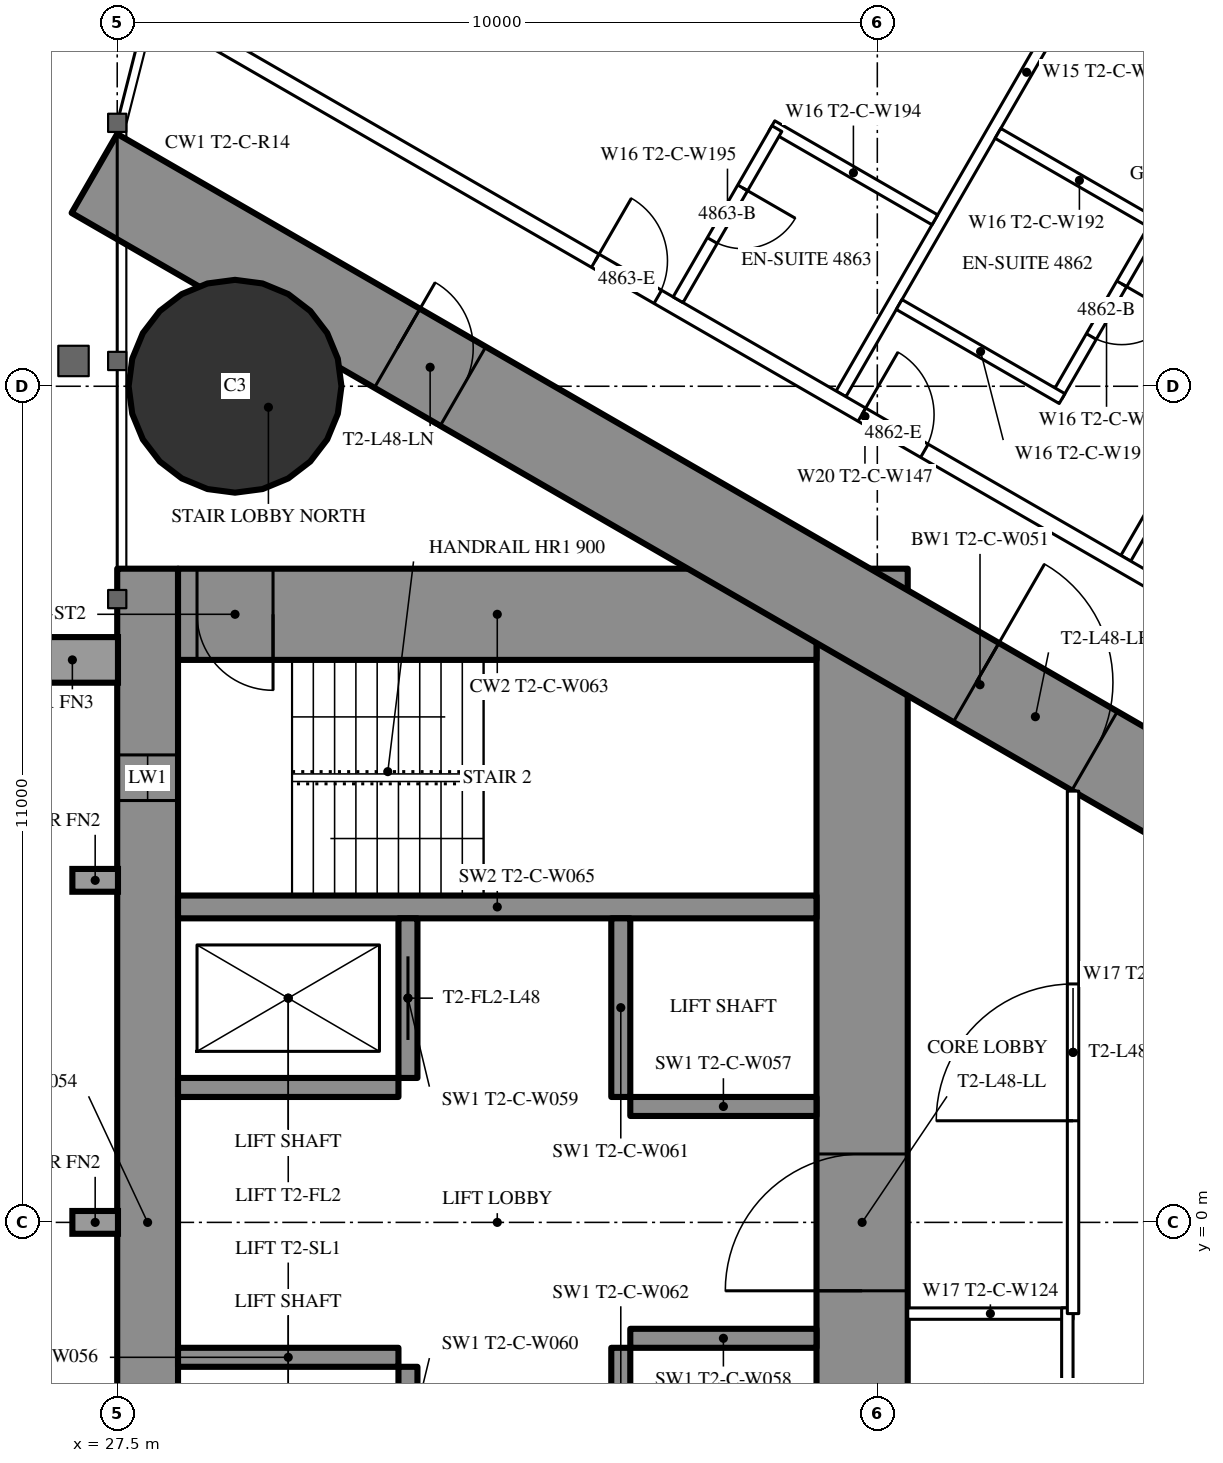
"""IFC4 building model, lengths in metres.
Left out: names, types, materials, properties, quantities, classifications, styles, units other than length and angle.
Written with IfcOpenShell. Run it as: python <this file> out.ifc"""

import sys

from ifc_helpers import new_model, si_unit, direction, frame, frame_2d, origin, origin_2d, place, context, subcontext, project, spatial, rectangle, circle, extrude, element, fill, save


model = new_model("IFC4")
c1 = context("Model", 3, precision=1e-05, world=origin(), true_north=direction((0.0, 1.0)))
c2 = subcontext(c1, "Body", "Model", "MODEL_VIEW")
j1 = project(units=[si_unit("LENGTHUNIT", "METRE"), si_unit("PLANEANGLEUNIT", "RADIAN")], contexts=[c1])
p1 = place(None, origin())
s1 = spatial("IfcSite", under=j1, at=p1, CompositionType="ELEMENT")
p2 = place(p1, origin())
s2 = spatial("IfcBuilding", under=s1, at=p2, CompositionType="ELEMENT")
p3 = place(p2, frame((0.0, 0.0, 180.8)))
s3 = spatial("IfcBuildingStorey", under=s2, at=p3, CompositionType="ELEMENT", Elevation=180.8)
p4 = place(p3, frame((29.05, 11.0, 0.0), z_axis=(0.0, 0.0, 1.0), x_axis=(1.0, 0.0, 0.0)))
e1 = element("IfcColumn", 1, at=p4, inside=s3, PredefinedType="COLUMN", context=c2, shape_type="SweptSolid", body=[
    extrude(circle(Radius=1.4, at=origin_2d()), origin(), (0.0, 0.0, 1.0), 3.5),
])
p5 = place(p3, frame((27.9, -8.6, 0.0), z_axis=(0.0, 0.0, 1.0), x_axis=(0.0, 1.0, 0.0)))
e2 = element("IfcWall", 2, at=p5, inside=s3, PredefinedType="SHEAR", context=c2, shape_type="SweptSolid", body=[
    extrude(rectangle(XDim=17.2, YDim=0.8, at=frame_2d((8.6, 0.0))), origin(), (0.0, 0.0, 1.0), 3.5),
])
p6 = place(p5, frame((2.45, 0.0, 0.6)))
e3 = element("IfcOpeningElement", 3, at=p6, cuts=e2, PredefinedType="OPENING", context=c2, shape_type="SweptSolid", body=[
    extrude(rectangle(XDim=0.6, YDim=2.1, at=frame_2d((0.3, 1.05))), frame((0.0, 0.41, 0.0), z_axis=(0.0, -1.0, 0.0), x_axis=(1.0, 0.0, 0.0)), (0.0, 0.0, 1.0), 0.82),
])
p7 = place(p5, frame((14.15, 0.0, 0.6)))
e4 = element("IfcOpeningElement", 4, at=p7, cuts=e2, PredefinedType="OPENING", context=c2, shape_type="SweptSolid", body=[
    extrude(rectangle(XDim=0.6, YDim=2.1, at=frame_2d((0.3, 1.05))), frame((0.0, 0.41, 0.0), z_axis=(0.0, -1.0, 0.0), x_axis=(1.0, 0.0, 0.0)), (0.0, 0.0, 1.0), 0.82),
])
p8 = place(p3, frame((37.3, -8.6, 0.0), z_axis=(0.0, 0.0, 1.0), x_axis=(0.0, 1.0, 0.0)))
e5 = element("IfcWall", 5, at=p8, inside=s3, PredefinedType="SHEAR", context=c2, shape_type="SweptSolid", body=[
    extrude(rectangle(XDim=17.2, YDim=1.2, at=frame_2d((8.6, 0.0))), origin(), (0.0, 0.0, 1.0), 3.5),
])
p9 = place(p8, frame((7.7, 0.0, 0.0)))
e6 = element("IfcOpeningElement", 6, at=p9, cuts=e5, PredefinedType="OPENING", context=c2, shape_type="SweptSolid", body=[
    extrude(rectangle(XDim=1.8, YDim=2.2, at=frame_2d((0.9, 1.1))), frame((0.0, 0.61, 0.0), z_axis=(0.0, -1.0, 0.0), x_axis=(1.0, 0.0, 0.0)), (0.0, 0.0, 1.0), 1.22),
])
p10 = place(p3, frame((28.3, 8.0, 0.0), z_axis=(0.0, 0.0, 1.0), x_axis=(1.0, 0.0, 0.0)))
e7 = element("IfcWall", 7, at=p10, inside=s3, PredefinedType="SHEAR", context=c2, shape_type="SweptSolid", body=[
    extrude(rectangle(XDim=8.4, YDim=1.2, at=frame_2d((4.2, 0.0))), origin(), (0.0, 0.0, 1.0), 3.5),
])
p11 = place(p10, frame((0.25, 0.0, 0.0)))
e8 = element("IfcOpeningElement", 8, at=p11, cuts=e7, PredefinedType="OPENING", context=c2, shape_type="SweptSolid", body=[
    extrude(rectangle(XDim=1.0, YDim=2.2, at=frame_2d((0.5, 1.1))), frame((0.0, 0.61, 0.0), z_axis=(0.0, -1.0, 0.0), x_axis=(1.0, 0.0, 0.0)), (0.0, 0.0, 1.0), 1.22),
])
p12 = place(p3, frame((28.3, 4.15, 0.0), z_axis=(0.0, 0.0, 1.0), x_axis=(1.0, 0.0, 0.0)))
e9 = element("IfcWall", 9, at=p12, inside=s3, PredefinedType="SHEAR", context=c2, shape_type="SweptSolid", body=[
    extrude(rectangle(XDim=8.4, YDim=0.3, at=frame_2d((4.2, 0.0))), origin(), (0.0, 0.0, 1.0), 3.5),
])
p13 = place(p3, frame((31.325, -4.0, 0.0), z_axis=(0.0, 0.0, 1.0), x_axis=(0.0, 1.0, 0.0)))
e10 = element("IfcWall", 10, at=p13, inside=s3, PredefinedType="SHEAR", context=c2, shape_type="SweptSolid", body=[
    extrude(rectangle(XDim=2.1, YDim=0.25, at=frame_2d((1.05, 0.0))), origin(), (0.0, 0.0, 1.0), 3.5),
])
p14 = place(p13, frame((0.5, 0.0, 0.0)))
e11 = element("IfcOpeningElement", 11, at=p14, cuts=e10, PredefinedType="OPENING", context=c2, shape_type="SweptSolid", body=[
    extrude(rectangle(XDim=1.1, YDim=2.2, at=frame_2d((0.55, 1.1))), frame((0.0, 0.135, 0.0), z_axis=(0.0, -1.0, 0.0), x_axis=(1.0, 0.0, 0.0)), (0.0, 0.0, 1.0), 0.27),
])
p15 = place(p3, frame((34.125, -4.0, 0.0), z_axis=(0.0, 0.0, 1.0), x_axis=(0.0, 1.0, 0.0)))
e12 = element("IfcWall", 12, at=p15, inside=s3, PredefinedType="SHEAR", context=c2, shape_type="SweptSolid", body=[
    extrude(rectangle(XDim=2.35, YDim=0.25, at=frame_2d((1.175, 0.0))), origin(), (0.0, 0.0, 1.0), 3.5),
])
p16 = place(p3, frame((28.3, -1.775, 0.0), z_axis=(0.0, 0.0, 1.0), x_axis=(1.0, 0.0, 0.0)))
e13 = element("IfcWall", 13, at=p16, inside=s3, PredefinedType="SHEAR", context=c2, shape_type="SweptSolid", body=[
    extrude(rectangle(XDim=2.9, YDim=0.25, at=frame_2d((1.45, 0.0))), origin(), (0.0, 0.0, 1.0), 3.5),
])
p17 = place(p3, frame((34.25, -1.525, 0.0), z_axis=(0.0, 0.0, 1.0), x_axis=(1.0, 0.0, 0.0)))
e14 = element("IfcWall", 14, at=p17, inside=s3, PredefinedType="SHEAR", context=c2, shape_type="SweptSolid", body=[
    extrude(rectangle(XDim=2.45, YDim=0.25, at=frame_2d((1.225, 0.0))), origin(), (0.0, 0.0, 1.0), 3.5),
])
p18 = place(p3, frame((31.325, 1.9, 0.0), z_axis=(0.0, 0.0, 1.0), x_axis=(0.0, 1.0, 0.0)))
e15 = element("IfcWall", 15, at=p18, inside=s3, PredefinedType="SHEAR", context=c2, shape_type="SweptSolid", body=[
    extrude(rectangle(XDim=2.1, YDim=0.25, at=frame_2d((1.05, 0.0))), origin(), (0.0, 0.0, 1.0), 3.5),
])
p19 = place(p18, frame((0.5, 0.0, 0.0)))
e16 = element("IfcOpeningElement", 16, at=p19, cuts=e15, PredefinedType="OPENING", context=c2, shape_type="SweptSolid", body=[
    extrude(rectangle(XDim=1.1, YDim=2.2, at=frame_2d((0.55, 1.1))), frame((0.0, 0.135, 0.0), z_axis=(0.0, -1.0, 0.0), x_axis=(1.0, 0.0, 0.0)), (0.0, 0.0, 1.0), 0.27),
])
p20 = place(p3, frame((34.125, 1.65, 0.0), z_axis=(0.0, 0.0, 1.0), x_axis=(0.0, 1.0, 0.0)))
e17 = element("IfcWall", 17, at=p20, inside=s3, PredefinedType="SHEAR", context=c2, shape_type="SweptSolid", body=[
    extrude(rectangle(XDim=2.35, YDim=0.25, at=frame_2d((1.175, 0.0))), origin(), (0.0, 0.0, 1.0), 3.5),
])
p21 = place(p3, frame((28.3, 1.775, 0.0), z_axis=(0.0, 0.0, 1.0), x_axis=(1.0, 0.0, 0.0)))
e18 = element("IfcWall", 18, at=p21, inside=s3, PredefinedType="SHEAR", context=c2, shape_type="SweptSolid", body=[
    extrude(rectangle(XDim=2.9, YDim=0.25, at=frame_2d((1.45, 0.0))), origin(), (0.0, 0.0, 1.0), 3.5),
])
p22 = place(p3, frame((34.25, 1.525, 0.0), z_axis=(0.0, 0.0, 1.0), x_axis=(1.0, 0.0, 0.0)))
e19 = element("IfcWall", 19, at=p22, inside=s3, PredefinedType="SHEAR", context=c2, shape_type="SweptSolid", body=[
    extrude(rectangle(XDim=2.45, YDim=0.25, at=frame_2d((1.225, 0.0))), origin(), (0.0, 0.0, 1.0), 3.5),
])
p23 = place(p3, frame((27.2, -13.8, 0.0), z_axis=(0.0, 0.0, 1.0), x_axis=(0.866027159892, 0.499996958321, 0.0)))
e20 = element("IfcWall", 20, at=p23, inside=s3, PredefinedType="SHEAR", context=c2, shape_type="SweptSolid", body=[
    extrude(rectangle(XDim=27.947, YDim=1.2, at=frame_2d((13.973, 0.0))), origin(), (0.0, 0.0, 1.0), 3.5),
])
p24 = place(p23, frame((4.6, 0.0, 0.0)))
e21 = element("IfcOpeningElement", 21, at=p24, cuts=e20, PredefinedType="OPENING", context=c2, shape_type="SweptSolid", body=[
    extrude(rectangle(XDim=1.0, YDim=2.2, at=frame_2d((0.5, 1.1))), frame((0.0, 0.61, 0.0), z_axis=(0.0, -1.0, 0.0), x_axis=(1.0, 0.0, 0.0)), (0.0, 0.0, 1.0), 1.22),
])
p25 = place(p23, frame((13.395, 0.0, 0.0)))
e22 = element("IfcOpeningElement", 22, at=p25, cuts=e20, PredefinedType="OPENING", context=c2, shape_type="SweptSolid", body=[
    extrude(rectangle(XDim=1.8, YDim=2.2, at=frame_2d((0.9, 1.1))), frame((0.0, 0.61, 0.0), z_axis=(0.0, -1.0, 0.0), x_axis=(1.0, 0.0, 0.0)), (0.0, 0.0, 1.0), 1.22),
])
p26 = place(p3, frame((27.2, 13.8, 0.0), z_axis=(0.0, 0.0, 1.0), x_axis=(0.866024515034, -0.500001539357, 0.0)))
e23 = element("IfcWall", 23, at=p26, inside=s3, PredefinedType="SHEAR", context=c2, shape_type="SweptSolid", body=[
    extrude(rectangle(XDim=26.907, YDim=1.2, at=frame_2d((13.454, 0.0))), origin(), (0.0, 0.0, 1.0), 3.5),
])
p27 = place(p26, frame((4.6, 0.0, 0.0)))
e24 = element("IfcOpeningElement", 24, at=p27, cuts=e23, PredefinedType="OPENING", context=c2, shape_type="SweptSolid", body=[
    extrude(rectangle(XDim=1.0, YDim=2.2, at=frame_2d((0.5, 1.1))), frame((0.0, 0.61, 0.0), z_axis=(0.0, -1.0, 0.0), x_axis=(1.0, 0.0, 0.0)), (0.0, 0.0, 1.0), 1.22),
])
p28 = place(p26, frame((13.395, 0.0, 0.0)))
e25 = element("IfcOpeningElement", 25, at=p28, cuts=e23, PredefinedType="OPENING", context=c2, shape_type="SweptSolid", body=[
    extrude(rectangle(XDim=1.8, YDim=2.2, at=frame_2d((0.9, 1.1))), frame((0.0, 0.61, 0.0), z_axis=(0.0, -1.0, 0.0), x_axis=(1.0, 0.0, 0.0)), (0.0, 0.0, 1.0), 1.22),
])
p29 = place(p3, frame((37.022, 10.9, 0.0), z_axis=(0.0, 0.0, 1.0), x_axis=(0.499998620953, 0.866026199976, 0.0)))
e26 = element("IfcWall", 26, at=p29, inside=s3, PredefinedType="PARTITIONING", context=c2, shape_type="SweptSolid", body=[
    extrude(rectangle(XDim=9.77, YDim=0.15, at=frame_2d((4.885, 0.0))), origin(), (0.0, 0.0, 1.0), 3.25),
])
p30 = place(p3, frame((40.769, 8.737, 0.0), z_axis=(0.0, 0.0, 1.0), x_axis=(0.500013115284, 0.866017831539, 0.0)))
e27 = element("IfcWall", 27, at=p30, inside=s3, PredefinedType="PARTITIONING", context=c2, shape_type="SweptSolid", body=[
    extrude(rectangle(XDim=7.198, YDim=0.15, at=frame_2d((3.599, 0.0))), origin(), (0.0, 0.0, 1.0), 2.3),
])
p31 = place(p3, frame((27.959, 16.017, 0.0), z_axis=(0.0, 0.0, 1.0), x_axis=(0.866027146794, -0.499996981007, 0.0)))
e28 = element("IfcWall", 28, at=p31, inside=s3, PredefinedType="PARTITIONING", context=c2, shape_type="SweptSolid", body=[
    extrude(rectangle(XDim=21.657, YDim=0.2, at=frame_2d((10.829, 0.0))), origin(), (0.0, 0.0, 1.0), 3.25),
])
p32 = place(p31, frame((17.741, 0.0, 0.0)))
e29 = element("IfcOpeningElement", 29, at=p32, cuts=e28, PredefinedType="OPENING", context=c2, shape_type="SweptSolid", body=[
    extrude(rectangle(XDim=0.95, YDim=2.2, at=frame_2d((0.475, 1.1))), frame((0.0, 0.11, 0.0), z_axis=(0.0, -1.0, 0.0), x_axis=(1.0, 0.0, 0.0)), (0.0, 0.0, 1.0), 0.22),
])
p33 = place(p31, frame((10.782, 0.0, 0.0)))
e30 = element("IfcOpeningElement", 30, at=p33, cuts=e28, PredefinedType="OPENING", context=c2, shape_type="SweptSolid", body=[
    extrude(rectangle(XDim=0.95, YDim=2.2, at=frame_2d((0.475, 1.1))), frame((0.0, 0.11, 0.0), z_axis=(0.0, -1.0, 0.0), x_axis=(1.0, 0.0, 0.0)), (0.0, 0.0, 1.0), 0.22),
])
p34 = place(p31, frame((6.732, 0.0, 0.0)))
e31 = element("IfcOpeningElement", 31, at=p34, cuts=e28, PredefinedType="OPENING", context=c2, shape_type="SweptSolid", body=[
    extrude(rectangle(XDim=0.95, YDim=2.2, at=frame_2d((0.475, 1.1))), frame((0.0, 0.11, 0.0), z_axis=(0.0, -1.0, 0.0), x_axis=(1.0, 0.0, 0.0)), (0.0, 0.0, 1.0), 0.22),
])
p35 = place(p31, frame((19.349, 0.0, 0.0)))
e32 = element("IfcOpeningElement", 32, at=p35, cuts=e28, PredefinedType="OPENING", context=c2, shape_type="SweptSolid", body=[
    extrude(rectangle(XDim=1.8, YDim=2.2, at=frame_2d((0.9, 1.1))), frame((0.0, 0.11, 0.0), z_axis=(0.0, -1.0, 0.0), x_axis=(1.0, 0.0, 0.0)), (0.0, 0.0, 1.0), 0.22),
])
p36 = place(p3, frame((39.087, 14.327, 0.0), z_axis=(0.0, 0.0, 1.0), x_axis=(0.866006523861, -0.500032699561, 0.0)))
e33 = element("IfcWall", 33, at=p36, inside=s3, PredefinedType="PARTITIONING", context=c2, shape_type="SweptSolid", body=[
    extrude(rectangle(XDim=2.475, YDim=0.15, at=frame_2d((1.237, 0.0))), origin(), (0.0, 0.0, 1.0), 3.25),
])
p37 = place(p3, frame((39.865, 10.875, 0.0), z_axis=(0.0, 0.0, 1.0), x_axis=(0.500047596559, 0.865997922154, 0.0)))
e34 = element("IfcWall", 34, at=p37, inside=s3, PredefinedType="PARTITIONING", context=c2, shape_type="SweptSolid", body=[
    extrude(rectangle(XDim=2.6, YDim=0.15, at=frame_2d((1.3, 0.0))), origin(), (0.0, 0.0, 1.0), 3.25),
])
p38 = place(p37, frame((0.9, 0.0, 0.0)))
e35 = element("IfcOpeningElement", 35, at=p38, cuts=e34, PredefinedType="OPENING", context=c2, shape_type="SweptSolid", body=[
    extrude(rectangle(XDim=0.8, YDim=2.2, at=frame_2d((0.4, 1.1))), frame((0.0, 0.085, 0.0), z_axis=(0.0, -1.0, 0.0), x_axis=(1.0, 0.0, 0.0)), (0.0, 0.0, 1.0), 0.17),
])
for number, where, z_axis, x_axis in (
    (36, (37.787, 12.075, 0.0), (0.0, 0.0, 1.0), (0.866, -0.5, 0.0)),
    (37, (36.114, 14.427, 0.0), (0.0, 0.0, 1.0), (0.866, -0.5, 0.0)),
):
    element("IfcWall", number, at=place(p3, frame(where, z_axis=z_axis, x_axis=x_axis)), inside=s3, PredefinedType="PARTITIONING", context=c2, shape_type="SweptSolid", body=[
        extrude(rectangle(XDim=2.475, YDim=0.15, at=frame_2d((1.237, 0.0))), origin(), (0.0, 0.0, 1.0), 3.25),
    ])
p39 = place(p3, frame((34.879, 12.138, 0.0), z_axis=(0.0, 0.0, 1.0), x_axis=(0.500006934395, 0.866021400173, 0.0)))
e38 = element("IfcWall", 38, at=p39, inside=s3, PredefinedType="PARTITIONING", context=c2, shape_type="SweptSolid", body=[
    extrude(rectangle(XDim=2.6, YDim=0.15, at=frame_2d((1.3, 0.0))), origin(), (0.0, 0.0, 1.0), 3.25),
])
p40 = place(p39, frame((0.9, 0.0, 0.0)))
e39 = element("IfcOpeningElement", 39, at=p40, cuts=e38, PredefinedType="OPENING", context=c2, shape_type="SweptSolid", body=[
    extrude(rectangle(XDim=0.8, YDim=2.2, at=frame_2d((0.4, 1.1))), frame((0.0, 0.085, 0.0), z_axis=(0.0, -1.0, 0.0), x_axis=(1.0, 0.0, 0.0)), (0.0, 0.0, 1.0), 0.17),
])
p41 = place(p3, frame((37.9, -1.2, 0.0), z_axis=(0.0, 0.0, 1.0), x_axis=(1.0, 0.0, 0.0)))
e40 = element("IfcWall", 40, at=p41, inside=s3, PredefinedType="PARTITIONING", context=c2, shape_type="SweptSolid", body=[
    extrude(rectangle(XDim=2.175, YDim=0.15, at=frame_2d((1.087, 0.0))), origin(), (0.0, 0.0, 1.0), 3.25),
])
p42 = place(p3, frame((40.0, -4.875, 0.0), z_axis=(0.0, 0.0, 1.0), x_axis=(0.0, 1.0, 0.0)))
e41 = element("IfcWall", 41, at=p42, inside=s3, PredefinedType="PARTITIONING", context=c2, shape_type="SweptSolid", body=[
    extrude(rectangle(XDim=3.75, YDim=0.15, at=frame_2d((1.875, 0.0))), origin(), (0.0, 0.0, 1.0), 3.25),
])
p43 = place(p42, frame((1.375, 0.0, 0.0)))
e42 = element("IfcOpeningElement", 42, at=p43, cuts=e41, PredefinedType="OPENING", context=c2, shape_type="SweptSolid", body=[
    extrude(rectangle(XDim=1.0, YDim=2.2, at=frame_2d((0.5, 1.1))), frame((0.0, 0.085, 0.0), z_axis=(0.0, -1.0, 0.0), x_axis=(1.0, 0.0, 0.0)), (0.0, 0.0, 1.0), 0.17),
])
p44 = place(p3, frame((40.075, -1.2, 0.0), z_axis=(0.0, 0.0, 1.0), x_axis=(0.0, 1.0, 0.0)))
e43 = element("IfcWall", 43, at=p44, inside=s3, PredefinedType="PARTITIONING", context=c2, shape_type="SweptSolid", body=[
    extrude(rectangle(XDim=6.874, YDim=0.15, at=frame_2d((3.437, 0.0))), origin(), (0.0, 0.0, 1.0), 3.25),
])
p45 = place(p44, frame((2.537, 0.0, 0.0)))
e44 = element("IfcOpeningElement", 44, at=p45, cuts=e43, PredefinedType="OPENING", context=c2, shape_type="SweptSolid", body=[
    extrude(rectangle(XDim=1.8, YDim=2.2, at=frame_2d((0.9, 1.1))), frame((0.0, 0.085, 0.0), z_axis=(0.0, -1.0, 0.0), x_axis=(1.0, 0.0, 0.0)), (0.0, 0.0, 1.0), 0.17),
])
p46 = place(p38, origin())
e45 = element("IfcDoor", 45, at=p46, inside=s3, OperationType="SINGLE_SWING_RIGHT", PredefinedType="DOOR", context=c2, shape_type="SweptSolid", body=[
    extrude(rectangle(XDim=0.8, YDim=2.2, at=frame_2d((0.4, 1.1))), frame((0.0, 0.025, 0.0), z_axis=(0.0, -1.0, 0.0), x_axis=(1.0, 0.0, 0.0)), (0.0, 0.0, 1.0), 0.05),
])
fill(e35, e45)
p47 = place(p33, origin())
e46 = element("IfcDoor", 46, at=p47, inside=s3, OperationType="SINGLE_SWING_LEFT", PredefinedType="DOOR", context=c2, shape_type="SweptSolid", body=[
    extrude(rectangle(XDim=0.95, YDim=2.2, at=frame_2d((0.475, 1.1))), frame((0.0, 0.025, 0.0), z_axis=(0.0, -1.0, 0.0), x_axis=(1.0, 0.0, 0.0)), (0.0, 0.0, 1.0), 0.05),
])
fill(e30, e46)
p48 = place(p40, origin())
e47 = element("IfcDoor", 47, at=p48, inside=s3, OperationType="SINGLE_SWING_RIGHT", PredefinedType="DOOR", context=c2, shape_type="SweptSolid", body=[
    extrude(rectangle(XDim=0.8, YDim=2.2, at=frame_2d((0.4, 1.1))), frame((0.0, 0.025, 0.0), z_axis=(0.0, -1.0, 0.0), x_axis=(1.0, 0.0, 0.0)), (0.0, 0.0, 1.0), 0.05),
])
fill(e39, e47)
p49 = place(p34, origin())
e48 = element("IfcDoor", 48, at=p49, inside=s3, OperationType="SINGLE_SWING_LEFT", PredefinedType="DOOR", context=c2, shape_type="SweptSolid", body=[
    extrude(rectangle(XDim=0.95, YDim=2.2, at=frame_2d((0.475, 1.1))), frame((0.0, 0.025, 0.0), z_axis=(0.0, -1.0, 0.0), x_axis=(1.0, 0.0, 0.0)), (0.0, 0.0, 1.0), 0.05),
])
fill(e31, e48)
p50 = place(p45, origin())
e49 = element("IfcDoor", 49, at=p50, inside=s3, OperationType="DOUBLE_DOOR_SINGLE_SWING", PredefinedType="DOOR", context=c2, shape_type="SweptSolid", body=[
    extrude(rectangle(XDim=1.8, YDim=2.2, at=frame_2d((0.9, 1.1))), frame((0.0, 0.025, 0.0), z_axis=(0.0, -1.0, 0.0), x_axis=(1.0, 0.0, 0.0)), (0.0, 0.0, 1.0), 0.05),
])
fill(e44, e49)
p51 = place(p27, origin())
e50 = element("IfcDoor", 50, at=p51, inside=s3, OperationType="SINGLE_SWING_LEFT", PredefinedType="DOOR", context=c2, shape_type="SweptSolid", body=[
    extrude(rectangle(XDim=1.0, YDim=2.2, at=frame_2d((0.5, 1.1))), frame((0.0, 0.025, 0.0), z_axis=(0.0, -1.0, 0.0), x_axis=(1.0, 0.0, 0.0)), (0.0, 0.0, 1.0), 0.05),
])
fill(e24, e50)
p52 = place(p28, origin())
e51 = element("IfcDoor", 51, at=p52, inside=s3, OperationType="DOUBLE_DOOR_SINGLE_SWING", PredefinedType="DOOR", context=c2, shape_type="SweptSolid", body=[
    extrude(rectangle(XDim=1.8, YDim=2.2, at=frame_2d((0.9, 1.1))), frame((0.0, 0.025, 0.0), z_axis=(0.0, -1.0, 0.0), x_axis=(1.0, 0.0, 0.0)), (0.0, 0.0, 1.0), 0.05),
])
fill(e25, e51)
p53 = place(p9, origin())
e52 = element("IfcDoor", 52, at=p53, inside=s3, OperationType="DOUBLE_DOOR_SINGLE_SWING", PredefinedType="DOOR", context=c2, shape_type="SweptSolid", body=[
    extrude(rectangle(XDim=1.8, YDim=2.2, at=frame_2d((0.9, 1.1))), frame((0.0, 0.025, 0.0), z_axis=(0.0, -1.0, 0.0), x_axis=(1.0, 0.0, 0.0)), (0.0, 0.0, 1.0), 0.05),
])
fill(e6, e52)
p54 = place(p11, origin())
e53 = element("IfcDoor", 53, at=p54, inside=s3, OperationType="SINGLE_SWING_RIGHT", PredefinedType="DOOR", context=c2, shape_type="SweptSolid", body=[
    extrude(rectangle(XDim=1.0, YDim=2.2, at=frame_2d((0.5, 1.1))), frame((0.0, 0.025, 0.0), z_axis=(0.0, -1.0, 0.0), x_axis=(1.0, 0.0, 0.0)), (0.0, 0.0, 1.0), 0.05),
])
fill(e8, e53)
p55 = place(p19, origin())
e54 = element("IfcDoor", 54, at=p55, inside=s3, OperationType="SLIDING_TO_LEFT", PredefinedType="USERDEFINED", context=c2, shape_type="SweptSolid", body=[
    extrude(rectangle(XDim=1.1, YDim=2.2, at=frame_2d((0.55, 1.1))), frame((0.0, 0.025, 0.0), z_axis=(0.0, -1.0, 0.0), x_axis=(1.0, 0.0, 0.0)), (0.0, 0.0, 1.0), 0.05),
])
fill(e16, e54)
p56 = place(p7, origin())
e55 = element("IfcWindow", 55, at=p56, inside=s3, PartitioningType="SINGLE_PANEL", PredefinedType="WINDOW", context=c2, shape_type="SweptSolid", body=[
    extrude(rectangle(XDim=0.6, YDim=2.1, at=frame_2d((0.3, 1.05))), frame((0.0, 0.03, 0.0), z_axis=(0.0, -1.0, 0.0), x_axis=(1.0, 0.0, 0.0)), (0.0, 0.0, 1.0), 0.06),
])
fill(e4, e55)
save(model, sys.argv[1])
